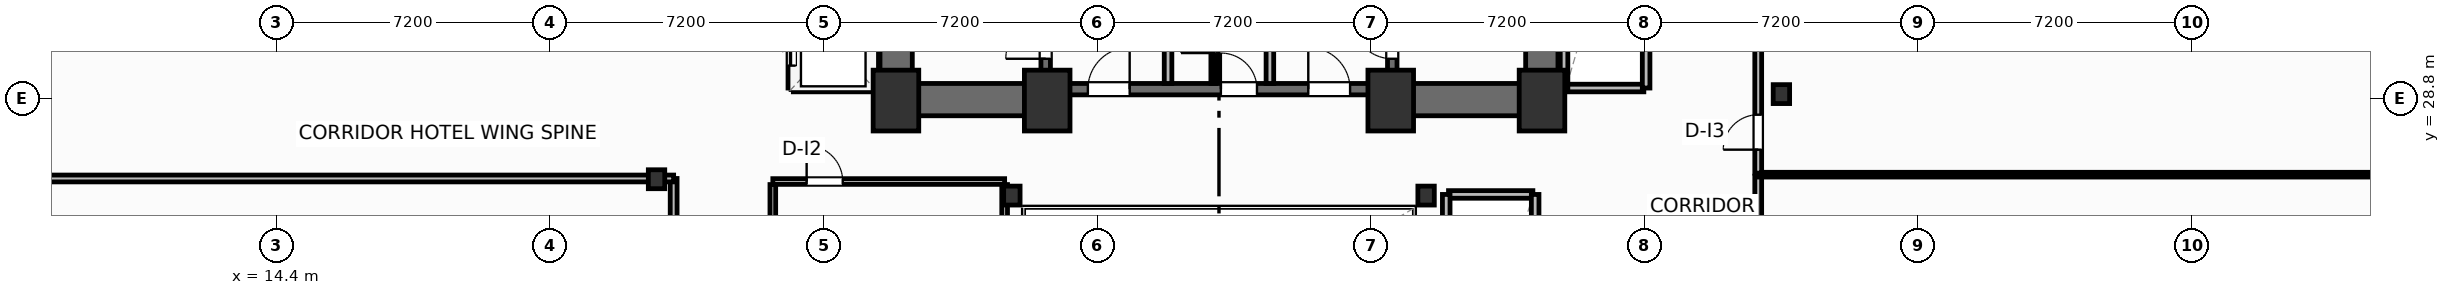
"""IFC4 building model, lengths in metres.
Left out: names, types, materials, properties, quantities, classifications, styles, units other than length and angle.
Written with IfcOpenShell. Run it as: python <this file> out.ifc"""

import sys

from ifc_helpers import new_model, si_unit, direction, frame, frame_2d, origin, origin_2d, place, context, subcontext, project, spatial, rectangle, i_section, extrude, element, fill, save


model = new_model("IFC4")
c1 = context("Model", 3, precision=1e-05, world=origin(), true_north=direction((0.0, 1.0)))
c2 = subcontext(c1, "Body", "Model", "MODEL_VIEW")
j1 = project(units=[si_unit("LENGTHUNIT", "METRE"), si_unit("PLANEANGLEUNIT", "RADIAN")], contexts=[c1])
p1 = place(None, origin())
s1 = spatial("IfcSite", under=j1, at=p1, CompositionType="ELEMENT")
p2 = place(p1, origin())
s2 = spatial("IfcBuilding", under=s1, at=p2, CompositionType="ELEMENT")
p3 = place(p2, frame((0.0, 0.0, 64.0)))
s3 = spatial("IfcBuildingStorey", under=s2, at=p3, CompositionType="ELEMENT", Elevation=64.0)
for number, where, z_axis, x_axis in (
    (1, (30.7, 28.75, 0.0), (0.0, 0.0, 1.0), (1.0, 0.0, 0.0)),
    (2, (34.68, 28.75, 0.0), (0.0, 0.0, 1.0), (1.0, 0.0, 0.0)),
    (3, (43.72, 28.75, 0.0), (0.0, 0.0, 1.0), (1.0, 0.0, 0.0)),
    (4, (47.7, 28.75, 0.0), (0.0, 0.0, 1.0), (1.0, 0.0, 0.0)),
):
    element("IfcColumn", number, at=place(p3, frame(where, z_axis=z_axis, x_axis=x_axis)), inside=s3, PredefinedType="COLUMN", context=c2, shape_type="SweptSolid", body=[
        extrude(rectangle(XDim=1.2, YDim=1.6, at=origin_2d()), origin(), (0.0, 0.0, 1.0), 3.7),
    ])
for number, where, z_axis, x_axis in (
    (5, (33.75, 26.25, 0.0), (0.0, 0.0, 1.0), (1.0, 0.0, 0.0)),
    (6, (44.65, 26.25, 0.0), (0.0, 0.0, 1.0), (1.0, 0.0, 0.0)),
    (7, (24.4, 26.68, 0.0), (0.0, 0.0, 1.0), (1.0, 0.0, 0.0)),
    (8, (54.0, 28.92, 0.0), (0.0, 0.0, 1.0), (1.0, 0.0, 0.0)),
):
    element("IfcColumn", number, at=place(p3, frame(where, z_axis=z_axis, x_axis=x_axis)), inside=s3, PredefinedType="COLUMN", context=c2, shape_type="SweptSolid", body=[
        extrude(i_section(OverallWidth=0.432, OverallDepth=0.498, WebThickness=0.056, FlangeThickness=0.089, FilletRadius=0.025, at=origin_2d()), origin(), (0.0, 0.0, 1.0), 3.7),
    ])
for number, where, z_axis, x_axis in (
    (9, (30.705, 29.2, 0.0), (0.0, 0.0, 1.0), (0.0, 1.0, 0.0)),
    (10, (47.695, 29.2, 0.0), (0.0, 0.0, 1.0), (0.0, 1.0, 0.0)),
):
    element("IfcWall", number, at=place(p3, frame(where, z_axis=z_axis, x_axis=x_axis)), inside=s3, PredefinedType="SHEAR", context=c2, shape_type="SweptSolid", body=[
        extrude(rectangle(XDim=9.22, YDim=0.85, at=frame_2d((4.61, 0.0))), origin(), (0.0, 0.0, 1.0), 3.45),
    ])
for number, where, z_axis, x_axis in (
    (11, (30.28, 28.775, 0.0), (0.0, 0.0, 1.0), (1.0, 0.0, 0.0)),
    (12, (43.6, 28.775, 0.0), (0.0, 0.0, 1.0), (1.0, 0.0, 0.0)),
):
    element("IfcWall", number, at=place(p3, frame(where, z_axis=z_axis, x_axis=x_axis)), inside=s3, PredefinedType="SHEAR", context=c2, shape_type="SweptSolid", body=[
        extrude(rectangle(XDim=4.52, YDim=0.85, at=frame_2d((2.26, 0.0))), origin(), (0.0, 0.0, 1.0), 3.45),
    ])
p4 = place(p3, frame((34.8, 29.05, 0.0), z_axis=(0.0, 0.0, 1.0), x_axis=(1.0, 0.0, 0.0)))
e13 = element("IfcWall", 13, at=p4, inside=s3, PredefinedType="SHEAR", context=c2, shape_type="SweptSolid", body=[
    extrude(rectangle(XDim=8.8, YDim=0.3, at=frame_2d((4.4, 0.0))), origin(), (0.0, 0.0, 1.0), 3.45),
])
p5 = place(p4, frame((0.95, 0.0, 0.0)))
e14 = element("IfcOpeningElement", 14, at=p5, cuts=e13, PredefinedType="OPENING", context=c2, shape_type="SweptSolid", body=[
    extrude(rectangle(XDim=1.1, YDim=2.15, at=frame_2d((0.55, 1.075))), frame((0.0, 0.16, 0.0), z_axis=(0.0, -1.0, 0.0), x_axis=(1.0, 0.0, 0.0)), (0.0, 0.0, 1.0), 0.32),
])
p6 = place(p4, frame((6.75, 0.0, 0.0)))
e15 = element("IfcOpeningElement", 15, at=p6, cuts=e13, PredefinedType="OPENING", context=c2, shape_type="SweptSolid", body=[
    extrude(rectangle(XDim=1.1, YDim=2.15, at=frame_2d((0.55, 1.075))), frame((0.0, 0.16, 0.0), z_axis=(0.0, -1.0, 0.0), x_axis=(1.0, 0.0, 0.0)), (0.0, 0.0, 1.0), 0.32),
])
p7 = place(p4, frame((4.45, 0.0, 0.0)))
e16 = element("IfcOpeningElement", 16, at=p7, cuts=e13, PredefinedType="OPENING", context=c2, shape_type="SweptSolid", body=[
    extrude(rectangle(XDim=0.95, YDim=2.15, at=frame_2d((0.475, 1.075))), frame((0.0, 0.16, 0.0), z_axis=(0.0, -1.0, 0.0), x_axis=(1.0, 0.0, 0.0)), (0.0, 0.0, 1.0), 0.32),
])
p8 = place(p3, frame((34.64, 29.2, 0.0), z_axis=(0.0, 0.0, 1.0), x_axis=(0.0, 1.0, 0.0)))
e17 = element("IfcWall", 17, at=p8, inside=s3, PredefinedType="SHEAR", context=c2, shape_type="SweptSolid", body=[
    extrude(rectangle(XDim=9.22, YDim=0.25, at=frame_2d((4.61, 0.0))), origin(), (0.0, 0.0, 1.0), 3.45),
])
p9 = place(p8, frame((0.65, 0.0, 0.0)))
e18 = element("IfcOpeningElement", 18, at=p9, cuts=e17, PredefinedType="OPENING", context=c2, shape_type="SweptSolid", body=[
    extrude(rectangle(XDim=1.05, YDim=2.15, at=frame_2d((0.525, 1.075))), frame((0.0, 0.135, 0.0), z_axis=(0.0, -1.0, 0.0), x_axis=(1.0, 0.0, 0.0)), (0.0, 0.0, 1.0), 0.27),
])
p10 = place(p3, frame((43.76, 29.2, 0.0), z_axis=(0.0, 0.0, 1.0), x_axis=(0.0, 1.0, 0.0)))
e19 = element("IfcWall", 19, at=p10, inside=s3, PredefinedType="SHEAR", context=c2, shape_type="SweptSolid", body=[
    extrude(rectangle(XDim=9.22, YDim=0.25, at=frame_2d((4.61, 0.0))), origin(), (0.0, 0.0, 1.0), 3.45),
])
p11 = place(p10, frame((0.65, 0.0, 0.0)))
e20 = element("IfcOpeningElement", 20, at=p11, cuts=e19, PredefinedType="OPENING", context=c2, shape_type="SweptSolid", body=[
    extrude(rectangle(XDim=1.05, YDim=2.15, at=frame_2d((0.525, 1.075))), frame((0.0, 0.135, 0.0), z_axis=(0.0, -1.0, 0.0), x_axis=(1.0, 0.0, 0.0)), (0.0, 0.0, 1.0), 0.27),
])
p12 = place(p3, frame((81.127, 26.995, 0.0), z_axis=(0.0, 0.0, 1.0), x_axis=(-0.823530169317, 0.567272474411, 0.0)))
e21 = element("IfcWall", 21, at=p12, inside=s3, PredefinedType="SOLIDWALL", context=c2, shape_type="SweptSolid", body=[
    extrude(rectangle(XDim=23.247, YDim=0.22, at=frame_2d((11.624, 0.0))), origin(), (0.0, 0.0, 1.0), 2.73),
])
p13 = place(p12, frame((10.799, 0.0, 0.8)))
e22 = element("IfcOpeningElement", 22, at=p13, cuts=e21, PredefinedType="OPENING", context=c2, shape_type="SweptSolid", body=[
    extrude(rectangle(XDim=1.65, YDim=1.65, at=frame_2d((0.825, 0.825))), frame((0.0, 0.12, 0.0), z_axis=(0.0, -1.0, 0.0), x_axis=(1.0, 0.0, 0.0)), (0.0, 0.0, 1.0), 0.24),
])
p14 = place(p3, frame((24.85, 19.24, 0.0), z_axis=(0.0, 0.0, 1.0), x_axis=(0.0, 1.0, 0.0)))
e23 = element("IfcWall", 23, at=p14, inside=s3, PredefinedType="PARTITIONING", context=c2, shape_type="SweptSolid", body=[
    extrude(rectangle(XDim=7.46, YDim=0.18, at=frame_2d((3.73, 0.0))), origin(), (0.0, 0.0, 1.0), 3.45),
])
p15 = place(p14, frame((3.235, 0.0, 0.0)))
e24 = element("IfcOpeningElement", 24, at=p15, cuts=e23, PredefinedType="OPENING", context=c2, shape_type="SweptSolid", body=[
    extrude(rectangle(XDim=0.95, YDim=2.05, at=frame_2d((0.475, 1.025))), frame((0.0, 0.1, 0.0), z_axis=(0.0, -1.0, 0.0), x_axis=(1.0, 0.0, 0.0)), (0.0, 0.0, 1.0), 0.2),
])
p16 = place(p3, frame((0.2, 26.7, 0.0), z_axis=(0.0, 0.0, 1.0), x_axis=(1.0, 0.0, 0.0)))
e25 = element("IfcWall", 25, at=p16, inside=s3, PredefinedType="PARTITIONING", context=c2, shape_type="SweptSolid", body=[
    extrude(rectangle(XDim=24.65, YDim=0.18, at=frame_2d((12.325, 0.0))), origin(), (0.0, 0.0, 1.0), 2.662),
])
p17 = place(p3, frame((53.39, 19.24, 0.0), z_axis=(0.0, 0.0, 1.0), x_axis=(0.0, 1.0, 0.0)))
e26 = element("IfcWall", 26, at=p17, inside=s3, PredefinedType="PARTITIONING", context=c2, shape_type="SweptSolid", body=[
    extrude(rectangle(XDim=7.52, YDim=0.18, at=frame_2d((3.76, 0.0))), origin(), (0.0, 0.0, 1.0), 3.45),
])
p18 = place(p17, frame((2.1, 0.0, 0.0)))
e27 = element("IfcOpeningElement", 27, at=p18, cuts=e26, PredefinedType="OPENING", context=c2, shape_type="SweptSolid", body=[
    extrude(rectangle(XDim=0.92, YDim=2.05, at=frame_2d((0.46, 1.025))), frame((0.0, 0.1, 0.0), z_axis=(0.0, -1.0, 0.0), x_axis=(1.0, 0.0, 0.0)), (0.0, 0.0, 1.0), 0.2),
])
p19 = place(p3, frame((53.39, 26.8, 0.0), z_axis=(0.0, 0.0, 1.0), x_axis=(1.0, 0.0, 0.0)))
e28 = element("IfcWall", 28, at=p19, inside=s3, PredefinedType="PARTITIONING", context=c2, shape_type="SweptSolid", body=[
    extrude(rectangle(XDim=23.61, YDim=0.125, at=frame_2d((11.805, 0.0))), origin(), (0.0, 0.0, 1.0), 3.45),
])
p20 = place(p3, frame((53.39, 26.84, 0.0), z_axis=(0.0, 0.0, 1.0), x_axis=(0.0, 1.0, 0.0)))
e29 = element("IfcWall", 29, at=p20, inside=s3, PredefinedType="PARTITIONING", context=c2, shape_type="SweptSolid", body=[
    extrude(rectangle(XDim=12.46, YDim=0.18, at=frame_2d((6.23, 0.0))), origin(), (0.0, 0.0, 1.0), 3.45),
])
p21 = place(p20, frame((0.618, 0.0, 0.0)))
e30 = element("IfcOpeningElement", 30, at=p21, cuts=e29, PredefinedType="OPENING", context=c2, shape_type="SweptSolid", body=[
    extrude(rectangle(XDim=0.92, YDim=2.05, at=frame_2d((0.46, 1.025))), frame((0.0, 0.1, 0.0), z_axis=(0.0, -1.0, 0.0), x_axis=(1.0, 0.0, 0.0)), (0.0, 0.0, 1.0), 0.2),
])
for number, where, z_axis, x_axis in (
    (31, (37.86, 29.2, 0.0), (0.0, 0.0, 1.0), (0.0, 1.0, 0.0)),
    (32, (40.54, 29.2, 0.0), (0.0, 0.0, 1.0), (0.0, 1.0, 0.0)),
):
    element("IfcWall", number, at=place(p3, frame(where, z_axis=z_axis, x_axis=x_axis)), inside=s3, PredefinedType="PARTITIONING", context=c2, shape_type="SweptSolid", body=[
        extrude(rectangle(XDim=5.18, YDim=0.2, at=frame_2d((2.59, 0.0))), origin(), (0.0, 0.0, 1.0), 3.45),
    ])
p22 = place(p3, frame((39.05, 29.2, 0.0), z_axis=(0.0, 0.0, 1.0), x_axis=(0.0, 1.0, 0.0)))
e33 = element("IfcWall", 33, at=p22, inside=s3, PredefinedType="PARTITIONING", context=c2, shape_type="SweptSolid", body=[
    extrude(rectangle(XDim=5.22, YDim=0.125, at=frame_2d((2.61, 0.0))), origin(), (0.0, 0.0, 1.0), 3.45),
])
p23 = place(p22, frame((0.8, 0.0, 0.0)))
e34 = element("IfcOpeningElement", 34, at=p23, cuts=e33, PredefinedType="OPENING", context=c2, shape_type="SweptSolid", body=[
    extrude(rectangle(XDim=0.85, YDim=2.05, at=frame_2d((0.425, 1.025))), frame((0.0, 0.073, 0.0), z_axis=(0.0, -1.0, 0.0), x_axis=(1.0, 0.0, 0.0)), (0.0, 0.0, 1.0), 0.145),
])
p24 = place(p22, frame((3.4, 0.0, 0.0)))
e35 = element("IfcOpeningElement", 35, at=p24, cuts=e33, PredefinedType="OPENING", context=c2, shape_type="SweptSolid", body=[
    extrude(rectangle(XDim=0.85, YDim=2.05, at=frame_2d((0.425, 1.025))), frame((0.0, 0.073, 0.0), z_axis=(0.0, -1.0, 0.0), x_axis=(1.0, 0.0, 0.0)), (0.0, 0.0, 1.0), 0.145),
])
p25 = place(p3, frame((27.46, 26.62, 0.0), z_axis=(0.0, 0.0, 1.0), x_axis=(1.0, 0.0, 0.0)))
e36 = element("IfcWall", 36, at=p25, inside=s3, PredefinedType="PARTITIONING", context=c2, shape_type="SweptSolid", body=[
    extrude(rectangle(XDim=6.1, YDim=0.15, at=frame_2d((3.05, 0.0))), origin(), (0.0, 0.0, 1.0), 2.662),
])
p26 = place(p25, frame((0.89, 0.0, 0.0)))
e37 = element("IfcOpeningElement", 37, at=p26, cuts=e36, PredefinedType="OPENING", context=c2, shape_type="SweptSolid", body=[
    extrude(rectangle(XDim=0.95, YDim=2.05, at=frame_2d((0.475, 1.025))), frame((0.0, 0.085, 0.0), z_axis=(0.0, -1.0, 0.0), x_axis=(1.0, 0.0, 0.0)), (0.0, 0.0, 1.0), 0.17),
])
p27 = place(p3, frame((27.46, 19.38, 0.0), z_axis=(0.0, 0.0, 1.0), x_axis=(0.0, 1.0, 0.0)))
e38 = element("IfcWall", 38, at=p27, inside=s3, PredefinedType="PARTITIONING", context=c2, shape_type="SweptSolid", body=[
    extrude(rectangle(XDim=7.16, YDim=0.15, at=frame_2d((3.58, 0.0))), origin(), (0.0, 0.0, 1.0), 3.45),
])
p28 = place(p27, frame((1.1, 0.0, 0.0)))
e39 = element("IfcOpeningElement", 39, at=p28, cuts=e38, PredefinedType="OPENING", context=c2, shape_type="SweptSolid", body=[
    extrude(rectangle(XDim=0.9, YDim=2.05, at=frame_2d((0.45, 1.025))), frame((0.0, 0.085, 0.0), z_axis=(0.0, -1.0, 0.0), x_axis=(1.0, 0.0, 0.0)), (0.0, 0.0, 1.0), 0.17),
])
p29 = place(p3, frame((33.56, 19.38, 0.0), z_axis=(0.0, 0.0, 1.0), x_axis=(0.0, 1.0, 0.0)))
e40 = element("IfcWall", 40, at=p29, inside=s3, PredefinedType="PARTITIONING", context=c2, shape_type="SweptSolid", body=[
    extrude(rectangle(XDim=7.16, YDim=0.15, at=frame_2d((3.58, 0.0))), origin(), (0.0, 0.0, 1.0), 2.824),
])
p30 = place(p3, frame((28.0, 29.08, 0.0), z_axis=(0.0, 0.0, 1.0), x_axis=(1.0, 0.0, 0.0)))
e41 = element("IfcWall", 41, at=p30, inside=s3, PredefinedType="PARTITIONING", context=c2, shape_type="SweptSolid", body=[
    extrude(rectangle(XDim=2.1, YDim=0.2, at=frame_2d((1.05, 0.0))), origin(), (0.0, 0.0, 1.0), 3.45),
])
p31 = place(p3, frame((30.12, 29.08, 0.0), z_axis=(0.0, 0.0, 1.0), x_axis=(0.0, 1.0, 0.0)))
e42 = element("IfcWall", 42, at=p31, inside=s3, PredefinedType="PARTITIONING", context=c2, shape_type="SweptSolid", body=[
    extrude(rectangle(XDim=6.89, YDim=0.2, at=frame_2d((3.445, 0.0))), origin(), (0.0, 0.0, 1.0), 3.45),
])
p32 = place(p3, frame((27.96, 29.08, 0.0), z_axis=(0.0, 0.0, 1.0), x_axis=(0.0, 1.0, 0.0)))
e43 = element("IfcWall", 43, at=p32, inside=s3, PredefinedType="PARTITIONING", context=c2, shape_type="SweptSolid", body=[
    extrude(rectangle(XDim=6.89, YDim=0.2, at=frame_2d((3.445, 0.0))), origin(), (0.0, 0.0, 1.0), 3.45),
])
p33 = place(p32, frame((0.59, 0.0, 0.0)))
e44 = element("IfcOpeningElement", 44, at=p33, cuts=e43, PredefinedType="OPENING", context=c2, shape_type="SweptSolid", body=[
    extrude(rectangle(XDim=1.1, YDim=2.15, at=frame_2d((0.55, 1.075))), frame((0.0, 0.11, 0.0), z_axis=(0.0, -1.0, 0.0), x_axis=(1.0, 0.0, 0.0)), (0.0, 0.0, 1.0), 0.22),
])
p34 = place(p32, frame((2.89, 0.0, 0.0)))
e45 = element("IfcOpeningElement", 45, at=p34, cuts=e43, PredefinedType="OPENING", context=c2, shape_type="SweptSolid", body=[
    extrude(rectangle(XDim=1.1, YDim=2.15, at=frame_2d((0.55, 1.075))), frame((0.0, 0.11, 0.0), z_axis=(0.0, -1.0, 0.0), x_axis=(1.0, 0.0, 0.0)), (0.0, 0.0, 1.0), 0.22),
])
p35 = place(p32, frame((5.19, 0.0, 0.0)))
e46 = element("IfcOpeningElement", 46, at=p35, cuts=e43, PredefinedType="OPENING", context=c2, shape_type="SweptSolid", body=[
    extrude(rectangle(XDim=1.1, YDim=2.15, at=frame_2d((0.55, 1.075))), frame((0.0, 0.11, 0.0), z_axis=(0.0, -1.0, 0.0), x_axis=(1.0, 0.0, 0.0)), (0.0, 0.0, 1.0), 0.22),
])
p36 = place(p3, frame((48.32, 29.08, 0.0), z_axis=(0.0, 0.0, 1.0), x_axis=(1.0, 0.0, 0.0)))
e47 = element("IfcWall", 47, at=p36, inside=s3, PredefinedType="PARTITIONING", context=c2, shape_type="SweptSolid", body=[
    extrude(rectangle(XDim=2.06, YDim=0.2, at=frame_2d((1.03, 0.0))), origin(), (0.0, 0.0, 1.0), 2.662),
])
for number, where, z_axis, x_axis in (
    (48, (48.28, 29.08, 0.0), (0.0, 0.0, 1.0), (0.0, 1.0, 0.0)),
    (49, (50.44, 29.08, 0.0), (0.0, 0.0, 1.0), (0.0, 1.0, 0.0)),
):
    element("IfcWall", number, at=place(p3, frame(where, z_axis=z_axis, x_axis=x_axis)), inside=s3, PredefinedType="PARTITIONING", context=c2, shape_type="SweptSolid", body=[
        extrude(rectangle(XDim=6.89, YDim=0.2, at=frame_2d((3.445, 0.0))), origin(), (0.0, 0.0, 1.0), 3.45),
    ])
p37 = place(p3, frame((45.24, 26.28, 0.0), z_axis=(0.0, 0.0, 1.0), x_axis=(1.0, 0.0, 0.0)))
e50 = element("IfcWall", 50, at=p37, inside=s3, PredefinedType="PARTITIONING", context=c2, shape_type="SweptSolid", body=[
    extrude(rectangle(XDim=2.22, YDim=0.2, at=frame_2d((1.11, 0.0))), origin(), (0.0, 0.0, 1.0), 3.45),
])
for number, where, z_axis, x_axis in (
    (51, (45.18, 19.38, 0.0), (0.0, 0.0, 1.0), (0.0, 1.0, 0.0)),
    (52, (47.52, 19.38, 0.0), (0.0, 0.0, 1.0), (0.0, 1.0, 0.0)),
):
    element("IfcWall", number, at=place(p3, frame(where, z_axis=z_axis, x_axis=x_axis)), inside=s3, PredefinedType="PARTITIONING", context=c2, shape_type="SweptSolid", body=[
        extrude(rectangle(XDim=6.9, YDim=0.2, at=frame_2d((3.45, 0.0))), origin(), (0.0, 0.0, 1.0), 3.45),
    ])
p38 = place(p21, origin())
e53 = element("IfcDoor", 53, at=p38, inside=s3, OperationType="SINGLE_SWING_LEFT", PredefinedType="DOOR", context=c2, shape_type="SweptSolid", body=[
    extrude(rectangle(XDim=0.92, YDim=2.05, at=frame_2d((0.46, 1.025))), frame((0.0, 0.025, 0.0), z_axis=(0.0, -1.0, 0.0), x_axis=(1.0, 0.0, 0.0)), (0.0, 0.0, 1.0), 0.05),
])
fill(e30, e53)
p39 = place(p9, origin())
e54 = element("IfcDoor", 54, at=p39, inside=s3, OperationType="SINGLE_SWING_LEFT", PredefinedType="DOOR", context=c2, shape_type="SweptSolid", body=[
    extrude(rectangle(XDim=1.05, YDim=2.15, at=frame_2d((0.525, 1.075))), frame((0.0, 0.025, 0.0), z_axis=(0.0, -1.0, 0.0), x_axis=(1.0, 0.0, 0.0)), (0.0, 0.0, 1.0), 0.05),
])
fill(e18, e54)
p40 = place(p11, origin())
e55 = element("IfcDoor", 55, at=p40, inside=s3, OperationType="SINGLE_SWING_RIGHT", PredefinedType="DOOR", context=c2, shape_type="SweptSolid", body=[
    extrude(rectangle(XDim=1.05, YDim=2.15, at=frame_2d((0.525, 1.075))), frame((0.0, 0.025, 0.0), z_axis=(0.0, -1.0, 0.0), x_axis=(1.0, 0.0, 0.0)), (0.0, 0.0, 1.0), 0.05),
])
fill(e20, e55)
p41 = place(p5, origin())
e56 = element("IfcDoor", 56, at=p41, inside=s3, OperationType="SINGLE_SWING_RIGHT", PredefinedType="DOOR", context=c2, shape_type="SweptSolid", body=[
    extrude(rectangle(XDim=1.1, YDim=2.15, at=frame_2d((0.55, 1.075))), frame((0.0, 0.025, 0.0), z_axis=(0.0, -1.0, 0.0), x_axis=(1.0, 0.0, 0.0)), (0.0, 0.0, 1.0), 0.05),
])
fill(e14, e56)
p42 = place(p6, origin())
e57 = element("IfcDoor", 57, at=p42, inside=s3, OperationType="SINGLE_SWING_LEFT", PredefinedType="DOOR", context=c2, shape_type="SweptSolid", body=[
    extrude(rectangle(XDim=1.1, YDim=2.15, at=frame_2d((0.55, 1.075))), frame((0.0, 0.025, 0.0), z_axis=(0.0, -1.0, 0.0), x_axis=(1.0, 0.0, 0.0)), (0.0, 0.0, 1.0), 0.05),
])
fill(e15, e57)
p43 = place(p23, origin())
e58 = element("IfcDoor", 58, at=p43, inside=s3, OperationType="SINGLE_SWING_LEFT", PredefinedType="DOOR", context=c2, shape_type="SweptSolid", body=[
    extrude(rectangle(XDim=0.85, YDim=2.05, at=frame_2d((0.425, 1.025))), frame((0.0, 0.025, 0.0), z_axis=(0.0, -1.0, 0.0), x_axis=(1.0, 0.0, 0.0)), (0.0, 0.0, 1.0), 0.05),
])
fill(e34, e58)
p44 = place(p7, origin())
e59 = element("IfcDoor", 59, at=p44, inside=s3, OperationType="SINGLE_SWING_LEFT", PredefinedType="DOOR", context=c2, shape_type="SweptSolid", body=[
    extrude(rectangle(XDim=0.95, YDim=2.15, at=frame_2d((0.475, 1.075))), frame((0.0, 0.025, 0.0), z_axis=(0.0, -1.0, 0.0), x_axis=(1.0, 0.0, 0.0)), (0.0, 0.0, 1.0), 0.05),
])
fill(e16, e59)
p45 = place(p26, origin())
e60 = element("IfcDoor", 60, at=p45, inside=s3, OperationType="SINGLE_SWING_LEFT", PredefinedType="DOOR", context=c2, shape_type="SweptSolid", body=[
    extrude(rectangle(XDim=0.95, YDim=2.05, at=frame_2d((0.475, 1.025))), frame((0.0, 0.025, 0.0), z_axis=(0.0, -1.0, 0.0), x_axis=(1.0, 0.0, 0.0)), (0.0, 0.0, 1.0), 0.05),
])
fill(e37, e60)
p46 = place(p33, origin())
e61 = element("IfcDoor", 61, at=p46, inside=s3, OperationType="SLIDING_TO_LEFT", PredefinedType="DOOR", context=c2, shape_type="SweptSolid", body=[
    extrude(rectangle(XDim=1.1, YDim=2.15, at=frame_2d((0.55, 1.075))), frame((0.0, 0.025, 0.0), z_axis=(0.0, -1.0, 0.0), x_axis=(1.0, 0.0, 0.0)), (0.0, 0.0, 1.0), 0.05),
])
fill(e44, e61)
save(model, sys.argv[1])
